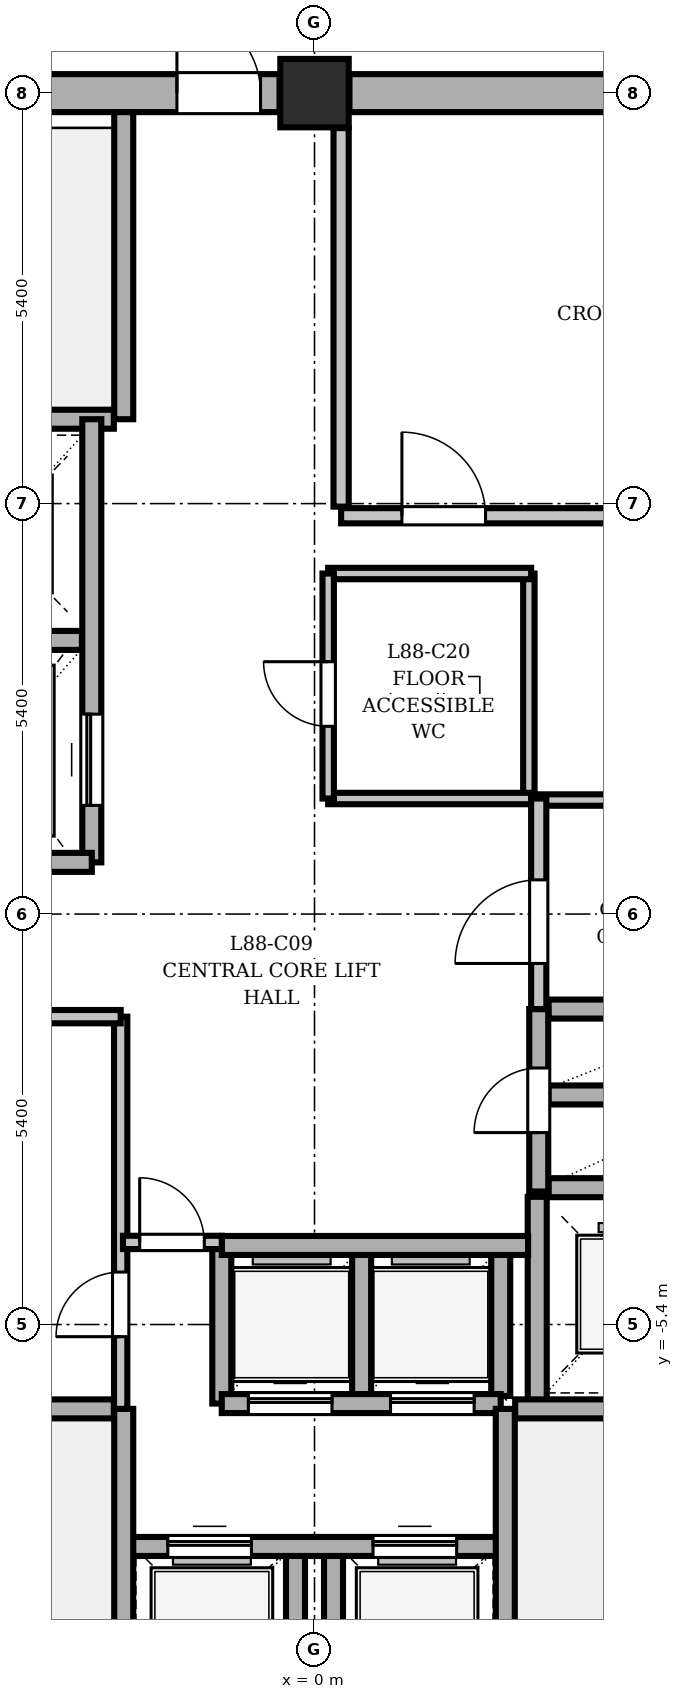
"""IFC4 building model, lengths in metres.
Left out: names, types, materials, properties, quantities, classifications, styles, units other than length and angle.
Written with IfcOpenShell. Run it as: python <this file> out.ifc"""

import sys

from ifc_helpers import new_model, si_unit, direction, frame, frame_2d, origin, origin_2d, place, context, subcontext, project, spatial, rectangle, extrude, element, fill, save


model = new_model("IFC4")
c1 = context("Model", 3, precision=1e-05, world=origin(), true_north=direction((0.0, 1.0)))
c2 = subcontext(c1, "Body", "Model", "MODEL_VIEW")
j1 = project(units=[si_unit("LENGTHUNIT", "METRE"), si_unit("PLANEANGLEUNIT", "RADIAN")], contexts=[c1])
p1 = place(None, origin())
s1 = spatial("IfcSite", under=j1, at=p1, CompositionType="ELEMENT")
p2 = place(p1, origin())
s2 = spatial("IfcBuilding", under=s1, at=p2, CompositionType="ELEMENT")
p3 = place(p2, frame((0.0, 0.0, 337.5)))
s3 = spatial("IfcBuildingStorey", under=s2, at=p3, CompositionType="ELEMENT", Elevation=337.5)
p4 = place(p3, frame((0.0, 10.8, 0.0), z_axis=(0.0, 0.0, 1.0), x_axis=(1.0, 0.0, 0.0)))
e1 = element("IfcColumn", 1, at=p4, inside=s3, PredefinedType="COLUMN", context=c2, shape_type="SweptSolid", body=[
    extrude(rectangle(XDim=0.9, YDim=0.9, at=origin_2d()), origin(), (0.0, 0.0, 1.0), 4.5),
])
p5 = place(p3, frame((-4.94, 10.8, 0.0), z_axis=(0.0, 0.0, 1.0), x_axis=(1.0, 0.0, 0.0)))
e2 = element("IfcWall", 2, at=p5, inside=s3, PredefinedType="SHEAR", context=c2, shape_type="SweptSolid", body=[
    extrude(rectangle(XDim=4.48, YDim=0.5, at=frame_2d((2.24, 0.0))), origin(), (0.0, 0.0, 1.0), 4.5),
])
p6 = place(p5, frame((3.13, 0.0, 0.0)))
e3 = element("IfcOpeningElement", 3, at=p6, cuts=e2, PredefinedType="OPENING", context=c2, shape_type="SweptSolid", body=[
    extrude(rectangle(XDim=1.1, YDim=2.1, at=frame_2d((0.55, 1.05))), frame((0.0, 0.26, 0.0), z_axis=(0.0, -1.0, 0.0), x_axis=(1.0, 0.0, 0.0)), (0.0, 0.0, 1.0), 0.52),
])
p7 = place(p3, frame((0.46, 10.8, 0.0), z_axis=(0.0, 0.0, 1.0), x_axis=(1.0, 0.0, 0.0)))
e4 = element("IfcWall", 4, at=p7, inside=s3, PredefinedType="SHEAR", context=c2, shape_type="SweptSolid", body=[
    extrude(rectangle(XDim=4.48, YDim=0.5, at=frame_2d((2.24, 0.0))), origin(), (0.0, 0.0, 1.0), 4.5),
])
p8 = place(p3, frame((2.93, -6.51, 0.0), z_axis=(0.0, 0.0, 1.0), x_axis=(0.0, 1.0, 0.0)))
e5 = element("IfcWall", 5, at=p8, inside=s3, PredefinedType="SHEAR", context=c2, shape_type="SweptSolid", body=[
    extrude(rectangle(XDim=2.79, YDim=0.25, at=frame_2d((1.395, 0.0))), origin(), (0.0, 0.0, 1.0), 4.5),
])
p9 = place(p3, frame((3.08, -3.6, 0.0), z_axis=(0.0, 0.0, 1.0), x_axis=(1.0, 0.0, 0.0)))
e6 = element("IfcWall", 6, at=p9, inside=s3, PredefinedType="SHEAR", context=c2, shape_type="SweptSolid", body=[
    extrude(rectangle(XDim=2.37, YDim=0.25, at=frame_2d((1.185, 0.0))), origin(), (0.0, 0.0, 1.0), 4.5),
])
for number, where, z_axis, x_axis in (
    (7, (0.62, -6.34, 0.0), (0.0, 0.0, 1.0), (0.0, 1.0, 0.0)),
    (8, (2.45, -6.34, 0.0), (0.0, 0.0, 1.0), (0.0, 1.0, 0.0)),
):
    element("IfcWall", number, at=place(p3, frame(where, z_axis=z_axis, x_axis=x_axis)), inside=s3, PredefinedType="SHEAR", context=c2, shape_type="SweptSolid", body=[
        extrude(rectangle(XDim=1.88, YDim=0.25, at=frame_2d((0.94, 0.0))), origin(), (0.0, 0.0, 1.0), 4.5),
    ])
for number, where, z_axis, x_axis in (
    (9, (-0.25, -10.35, 0.0), (0.0, 0.0, 1.0), (0.0, 1.0, 0.0)),
    (10, (0.25, -10.35, 0.0), (0.0, 0.0, 1.0), (0.0, 1.0, 0.0)),
):
    element("IfcWall", number, at=place(p3, frame(where, z_axis=z_axis, x_axis=x_axis)), inside=s3, PredefinedType="SHEAR", context=c2, shape_type="SweptSolid", body=[
        extrude(rectangle(XDim=1.91, YDim=0.25, at=frame_2d((0.955, 0.0))), origin(), (0.0, 0.0, 1.0), 4.5),
    ])
p10 = place(p3, frame((-1.22, -6.44, 0.0), z_axis=(0.0, 0.0, 1.0), x_axis=(0.0, 1.0, 0.0)))
e11 = element("IfcWall", 11, at=p10, inside=s3, PredefinedType="SHEAR", context=c2, shape_type="SweptSolid", body=[
    extrude(rectangle(XDim=2.08, YDim=0.25, at=frame_2d((1.04, 0.0))), origin(), (0.0, 0.0, 1.0), 4.5),
])
p11 = place(p3, frame((-1.22, -6.44, 0.0), z_axis=(0.0, 0.0, 1.0), x_axis=(1.0, 0.0, 0.0)))
e12 = element("IfcWall", 12, at=p11, inside=s3, PredefinedType="SHEAR", context=c2, shape_type="SweptSolid", body=[
    extrude(rectangle(XDim=3.67, YDim=0.25, at=frame_2d((1.835, 0.0))), origin(), (0.0, 0.0, 1.0), 4.5),
])
p12 = place(p11, frame((0.35, 0.0, 0.0)))
e13 = element("IfcOpeningElement", 13, at=p12, cuts=e12, PredefinedType="OPENING", context=c2, shape_type="SweptSolid", body=[
    extrude(rectangle(XDim=1.1, YDim=2.1, at=frame_2d((0.55, 1.05))), frame((0.0, 0.135, 0.0), z_axis=(0.0, -1.0, 0.0), x_axis=(1.0, 0.0, 0.0)), (0.0, 0.0, 1.0), 0.27),
])
p13 = place(p11, frame((2.22, 0.0, 0.0)))
e14 = element("IfcOpeningElement", 14, at=p13, cuts=e12, PredefinedType="OPENING", context=c2, shape_type="SweptSolid", body=[
    extrude(rectangle(XDim=1.1, YDim=2.1, at=frame_2d((0.55, 1.05))), frame((0.0, 0.135, 0.0), z_axis=(0.0, -1.0, 0.0), x_axis=(1.0, 0.0, 0.0)), (0.0, 0.0, 1.0), 0.27),
])
p14 = place(p3, frame((-2.48, -8.32, 0.0), z_axis=(0.0, 0.0, 1.0), x_axis=(1.0, 0.0, 0.0)))
e15 = element("IfcWall", 15, at=p14, inside=s3, PredefinedType="SHEAR", context=c2, shape_type="SweptSolid", body=[
    extrude(rectangle(XDim=4.93, YDim=0.25, at=frame_2d((2.465, 0.0))), origin(), (0.0, 0.0, 1.0), 4.5),
])
p15 = place(p14, frame((0.55, 0.0, 0.0)))
e16 = element("IfcOpeningElement", 16, at=p15, cuts=e15, PredefinedType="OPENING", context=c2, shape_type="SweptSolid", body=[
    extrude(rectangle(XDim=1.1, YDim=2.1, at=frame_2d((0.55, 1.05))), frame((0.0, 0.135, 0.0), z_axis=(0.0, -1.0, 0.0), x_axis=(1.0, 0.0, 0.0)), (0.0, 0.0, 1.0), 0.27),
])
p16 = place(p14, frame((3.25, 0.0, 0.0)))
e17 = element("IfcOpeningElement", 17, at=p16, cuts=e15, PredefinedType="OPENING", context=c2, shape_type="SweptSolid", body=[
    extrude(rectangle(XDim=1.1, YDim=2.1, at=frame_2d((0.55, 1.05))), frame((0.0, 0.135, 0.0), z_axis=(0.0, -1.0, 0.0), x_axis=(1.0, 0.0, 0.0)), (0.0, 0.0, 1.0), 0.27),
])
p17 = place(p3, frame((-1.22, -4.36, 0.0), z_axis=(0.0, 0.0, 1.0), x_axis=(1.0, 0.0, 0.0)))
e18 = element("IfcWall", 18, at=p17, inside=s3, PredefinedType="SHEAR", context=c2, shape_type="SweptSolid", body=[
    extrude(rectangle(XDim=4.03, YDim=0.25, at=frame_2d((2.015, 0.0))), origin(), (0.0, 0.0, 1.0), 4.5),
])
for number, where, z_axis, x_axis in (
    (19, (3.08, -2.38, 0.0), (0.0, 0.0, 1.0), (1.0, 0.0, 0.0)),
    (20, (3.08, -1.25, 0.0), (0.0, 0.0, 1.0), (1.0, 0.0, 0.0)),
):
    element("IfcWall", number, at=place(p3, frame(where, z_axis=z_axis, x_axis=x_axis)), inside=s3, PredefinedType="SHEAR", context=c2, shape_type="SweptSolid", body=[
        extrude(rectangle(XDim=2.37, YDim=0.25, at=frame_2d((1.185, 0.0))), origin(), (0.0, 0.0, 1.0), 4.5),
    ])
p18 = place(p3, frame((2.95, -3.65, 0.0), z_axis=(0.0, 0.0, 1.0), x_axis=(0.0, 1.0, 0.0)))
e21 = element("IfcWall", 21, at=p18, inside=s3, PredefinedType="SHEAR", context=c2, shape_type="SweptSolid", body=[
    extrude(rectangle(XDim=2.4, YDim=0.25, at=frame_2d((1.2, 0.0))), origin(), (0.0, 0.0, 1.0), 4.5),
])
p19 = place(p18, frame((0.775, 0.0, 0.0)))
e22 = element("IfcOpeningElement", 22, at=p19, cuts=e21, PredefinedType="OPENING", context=c2, shape_type="SweptSolid", body=[
    extrude(rectangle(XDim=0.85, YDim=2.1, at=frame_2d((0.425, 1.05))), frame((0.0, 0.135, 0.0), z_axis=(0.0, -1.0, 0.0), x_axis=(1.0, 0.0, 0.0)), (0.0, 0.0, 1.0), 0.27),
])
p20 = place(p3, frame((-2.51, 6.51, 0.0), z_axis=(0.0, 0.0, 1.0), x_axis=(0.0, 1.0, 0.0)))
e23 = element("IfcWall", 23, at=p20, inside=s3, PredefinedType="SHEAR", context=c2, shape_type="SweptSolid", body=[
    extrude(rectangle(XDim=4.04, YDim=0.25, at=frame_2d((2.02, 0.0))), origin(), (0.0, 0.0, 1.0), 4.5),
])
p21 = place(p3, frame((-10.34, 6.51, 0.0), z_axis=(0.0, 0.0, 1.0), x_axis=(1.0, 0.0, 0.0)))
e24 = element("IfcWall", 24, at=p21, inside=s3, PredefinedType="SHEAR", context=c2, shape_type="SweptSolid", body=[
    extrude(rectangle(XDim=7.7, YDim=0.25, at=frame_2d((3.85, 0.0))), origin(), (0.0, 0.0, 1.0), 4.5),
])
p22 = place(p21, frame((0.35, 0.0, 0.0)))
e25 = element("IfcOpeningElement", 25, at=p22, cuts=e24, PredefinedType="OPENING", context=c2, shape_type="SweptSolid", body=[
    extrude(rectangle(XDim=1.1, YDim=2.1, at=frame_2d((0.55, 1.05))), frame((0.0, 0.135, 0.0), z_axis=(0.0, -1.0, 0.0), x_axis=(1.0, 0.0, 0.0)), (0.0, 0.0, 1.0), 0.27),
])
p23 = place(p3, frame((2.64, -6.51, 0.0), z_axis=(0.0, 0.0, 1.0), x_axis=(1.0, 0.0, 0.0)))
e26 = element("IfcWall", 26, at=p23, inside=s3, PredefinedType="SHEAR", context=c2, shape_type="SweptSolid", body=[
    extrude(rectangle(XDim=7.7, YDim=0.25, at=frame_2d((3.85, 0.0))), origin(), (0.0, 0.0, 1.0), 4.5),
])
p24 = place(p23, frame((6.0, 0.0, 0.0)))
e27 = element("IfcOpeningElement", 27, at=p24, cuts=e26, PredefinedType="OPENING", context=c2, shape_type="SweptSolid", body=[
    extrude(rectangle(XDim=0.95, YDim=2.1, at=frame_2d((0.475, 1.05))), frame((0.0, 0.135, 0.0), z_axis=(0.0, -1.0, 0.0), x_axis=(1.0, 0.0, 0.0)), (0.0, 0.0, 1.0), 0.27),
])
for number, where, z_axis, x_axis in (
    (28, (2.51, -10.55, 0.0), (0.0, 0.0, 1.0), (0.0, 1.0, 0.0)),
    (29, (-2.51, -10.55, 0.0), (0.0, 0.0, 1.0), (0.0, 1.0, 0.0)),
):
    element("IfcWall", number, at=place(p3, frame(where, z_axis=z_axis, x_axis=x_axis)), inside=s3, PredefinedType="SHEAR", context=c2, shape_type="SweptSolid", body=[
        extrude(rectangle(XDim=4.04, YDim=0.25, at=frame_2d((2.02, 0.0))), origin(), (0.0, 0.0, 1.0), 4.5),
    ])
p25 = place(p3, frame((-10.34, -6.51, 0.0), z_axis=(0.0, 0.0, 1.0), x_axis=(1.0, 0.0, 0.0)))
e30 = element("IfcWall", 30, at=p25, inside=s3, PredefinedType="SHEAR", context=c2, shape_type="SweptSolid", body=[
    extrude(rectangle(XDim=7.7, YDim=0.25, at=frame_2d((3.85, 0.0))), origin(), (0.0, 0.0, 1.0), 4.5),
])
p26 = place(p25, frame((0.35, 0.0, 0.0)))
e31 = element("IfcOpeningElement", 31, at=p26, cuts=e30, PredefinedType="OPENING", context=c2, shape_type="SweptSolid", body=[
    extrude(rectangle(XDim=1.1, YDim=2.1, at=frame_2d((0.55, 1.05))), frame((0.0, 0.135, 0.0), z_axis=(0.0, -1.0, 0.0), x_axis=(1.0, 0.0, 0.0)), (0.0, 0.0, 1.0), 0.27),
])
p27 = place(p3, frame((-2.93, 0.68, 0.0), z_axis=(0.0, 0.0, 1.0), x_axis=(0.0, 1.0, 0.0)))
e32 = element("IfcWall", 32, at=p27, inside=s3, PredefinedType="SHEAR", context=c2, shape_type="SweptSolid", body=[
    extrude(rectangle(XDim=5.83, YDim=0.25, at=frame_2d((2.915, 0.0))), origin(), (0.0, 0.0, 1.0), 4.5),
])
p28 = place(p27, frame((0.75, 0.0, 0.0)))
e33 = element("IfcOpeningElement", 33, at=p28, cuts=e32, PredefinedType="OPENING", context=c2, shape_type="SweptSolid", body=[
    extrude(rectangle(XDim=1.2, YDim=2.1, at=frame_2d((0.6, 1.05))), frame((0.0, 0.135, 0.0), z_axis=(0.0, -1.0, 0.0), x_axis=(1.0, 0.0, 0.0)), (0.0, 0.0, 1.0), 0.27),
])
p29 = place(p3, frame((-5.45, 3.6, 0.0), z_axis=(0.0, 0.0, 1.0), x_axis=(1.0, 0.0, 0.0)))
e34 = element("IfcWall", 34, at=p29, inside=s3, PredefinedType="SHEAR", context=c2, shape_type="SweptSolid", body=[
    extrude(rectangle(XDim=2.39, YDim=0.25, at=frame_2d((1.195, 0.0))), origin(), (0.0, 0.0, 1.0), 4.5),
])
p30 = place(p3, frame((-5.58, 0.68, 0.0), z_axis=(0.0, 0.0, 1.0), x_axis=(1.0, 0.0, 0.0)))
e35 = element("IfcWall", 35, at=p30, inside=s3, PredefinedType="SHEAR", context=c2, shape_type="SweptSolid", body=[
    extrude(rectangle(XDim=2.65, YDim=0.25, at=frame_2d((1.325, 0.0))), origin(), (0.0, 0.0, 1.0), 4.5),
])
p31 = place(p3, frame((2.82, 1.52, 0.0), z_axis=(0.0, 0.0, 1.0), x_axis=(0.0, 1.0, 0.0)))
e36 = element("IfcWall", 36, at=p31, inside=s3, PredefinedType="PARTITIONING", context=c2, shape_type="SweptSolid", body=[
    extrude(rectangle(XDim=2.96, YDim=0.15, at=frame_2d((1.48, 0.0))), origin(), (0.0, 0.0, 1.0), 4.22),
])
for number, where, z_axis, x_axis in (
    (37, (0.18, 4.48, 0.0), (0.0, 0.0, 1.0), (1.0, 0.0, 0.0)),
    (38, (0.18, 1.52, 0.0), (0.0, 0.0, 1.0), (1.0, 0.0, 0.0)),
):
    element("IfcWall", number, at=place(p3, frame(where, z_axis=z_axis, x_axis=x_axis)), inside=s3, PredefinedType="PARTITIONING", context=c2, shape_type="SweptSolid", body=[
        extrude(rectangle(XDim=2.67, YDim=0.15, at=frame_2d((1.335, 0.0))), origin(), (0.0, 0.0, 1.0), 4.22),
    ])
p32 = place(p3, frame((0.18, 1.52, 0.0), z_axis=(0.0, 0.0, 1.0), x_axis=(0.0, 1.0, 0.0)))
e39 = element("IfcWall", 39, at=p32, inside=s3, PredefinedType="PARTITIONING", context=c2, shape_type="SweptSolid", body=[
    extrude(rectangle(XDim=2.96, YDim=0.15, at=frame_2d((1.48, 0.0))), origin(), (0.0, 0.0, 1.0), 4.22),
])
p33 = place(p32, frame((0.95, 0.0, 0.0)))
e40 = element("IfcOpeningElement", 40, at=p33, cuts=e39, PredefinedType="OPENING", context=c2, shape_type="SweptSolid", body=[
    extrude(rectangle(XDim=0.85, YDim=2.1, at=frame_2d((0.425, 1.05))), frame((0.0, 0.085, 0.0), z_axis=(0.0, -1.0, 0.0), x_axis=(1.0, 0.0, 0.0)), (0.0, 0.0, 1.0), 0.17),
])
p34 = place(p3, frame((2.95, 1.5, 0.0), z_axis=(0.0, 0.0, 1.0), x_axis=(1.0, 0.0, 0.0)))
e41 = element("IfcWall", 41, at=p34, inside=s3, PredefinedType="PARTITIONING", context=c2, shape_type="SweptSolid", body=[
    extrude(rectangle(XDim=7.39, YDim=0.15, at=frame_2d((3.695, 0.0))), origin(), (0.0, 0.0, 1.0), 4.22),
])
p35 = place(p34, frame((2.2, 0.0, 0.0)))
e42 = element("IfcOpeningElement", 42, at=p35, cuts=e41, PredefinedType="OPENING", context=c2, shape_type="SweptSolid", body=[
    extrude(rectangle(XDim=0.95, YDim=2.1, at=frame_2d((0.475, 1.05))), frame((0.0, 0.085, 0.0), z_axis=(0.0, -1.0, 0.0), x_axis=(1.0, 0.0, 0.0)), (0.0, 0.0, 1.0), 0.17),
])
p36 = place(p3, frame((0.35, 5.24, 0.0), z_axis=(0.0, 0.0, 1.0), x_axis=(1.0, 0.0, 0.0)))
e43 = element("IfcWall", 43, at=p36, inside=s3, PredefinedType="PARTITIONING", context=c2, shape_type="SweptSolid", body=[
    extrude(rectangle(XDim=9.99, YDim=0.2, at=frame_2d((4.995, 0.0))), origin(), (0.0, 0.0, 1.0), 4.22),
])
p37 = place(p36, frame((0.8, 0.0, 0.0)))
e44 = element("IfcOpeningElement", 44, at=p37, cuts=e43, PredefinedType="OPENING", context=c2, shape_type="SweptSolid", body=[
    extrude(rectangle(XDim=1.1, YDim=2.1, at=frame_2d((0.55, 1.05))), frame((0.0, 0.11, 0.0), z_axis=(0.0, -1.0, 0.0), x_axis=(1.0, 0.0, 0.0)), (0.0, 0.0, 1.0), 0.22),
])
p38 = place(p3, frame((0.35, 5.36, 0.0), z_axis=(0.0, 0.0, 1.0), x_axis=(0.0, 1.0, 0.0)))
e45 = element("IfcWall", 45, at=p38, inside=s3, PredefinedType="PARTITIONING", context=c2, shape_type="SweptSolid", body=[
    extrude(rectangle(XDim=4.98, YDim=0.2, at=frame_2d((2.49, 0.0))), origin(), (0.0, 0.0, 1.0), 4.22),
])
p39 = place(p3, frame((-2.55, -6.51, 0.0), z_axis=(0.0, 0.0, 1.0), x_axis=(0.0, 1.0, 0.0)))
e46 = element("IfcWall", 46, at=p39, inside=s3, PredefinedType="PARTITIONING", context=c2, shape_type="SweptSolid", body=[
    extrude(rectangle(XDim=5.16, YDim=0.175, at=frame_2d((2.58, 0.0))), origin(), (0.0, 0.0, 1.0), 4.22),
])
p40 = place(p39, frame((0.95, 0.0, 0.0)))
e47 = element("IfcOpeningElement", 47, at=p40, cuts=e46, PredefinedType="OPENING", context=c2, shape_type="SweptSolid", body=[
    extrude(rectangle(XDim=0.85, YDim=2.1, at=frame_2d((0.425, 1.05))), frame((0.0, 0.097, 0.0), z_axis=(0.0, -1.0, 0.0), x_axis=(1.0, 0.0, 0.0)), (0.0, 0.0, 1.0), 0.195),
])
p41 = place(p3, frame((-7.18, -1.35, 0.0), z_axis=(0.0, 0.0, 1.0), x_axis=(1.0, 0.0, 0.0)))
e48 = element("IfcWall", 48, at=p41, inside=s3, PredefinedType="PARTITIONING", context=c2, shape_type="SweptSolid", body=[
    extrude(rectangle(XDim=4.63, YDim=0.175, at=frame_2d((2.315, 0.0))), origin(), (0.0, 0.0, 1.0), 4.22),
])
p42 = place(p3, frame((-2.52, -4.32, 0.0), z_axis=(0.0, 0.0, 1.0), x_axis=(1.0, 0.0, 0.0)))
e49 = element("IfcWall", 49, at=p42, inside=s3, PredefinedType="PARTITIONING", context=c2, shape_type="SweptSolid", body=[
    extrude(rectangle(XDim=1.3, YDim=0.175, at=frame_2d((0.65, 0.0))), origin(), (0.0, 0.0, 1.0), 4.22),
])
p43 = place(p42, frame((0.22, 0.0, 0.0)))
e50 = element("IfcOpeningElement", 50, at=p43, cuts=e49, PredefinedType="OPENING", context=c2, shape_type="SweptSolid", body=[
    extrude(rectangle(XDim=0.85, YDim=2.1, at=frame_2d((0.425, 1.05))), frame((0.0, 0.097, 0.0), z_axis=(0.0, -1.0, 0.0), x_axis=(1.0, 0.0, 0.0)), (0.0, 0.0, 1.0), 0.195),
])
p44 = place(p3, frame((2.95, -1.25, 0.0), z_axis=(0.0, 0.0, 1.0), x_axis=(0.0, 1.0, 0.0)))
e51 = element("IfcWall", 51, at=p44, inside=s3, PredefinedType="PARTITIONING", context=c2, shape_type="SweptSolid", body=[
    extrude(rectangle(XDim=2.77, YDim=0.2, at=frame_2d((1.385, 0.0))), origin(), (0.0, 0.0, 1.0), 4.22),
])
p45 = place(p44, frame((0.6, 0.0, 0.0)))
e52 = element("IfcOpeningElement", 52, at=p45, cuts=e51, PredefinedType="OPENING", context=c2, shape_type="SweptSolid", body=[
    extrude(rectangle(XDim=1.1, YDim=2.1, at=frame_2d((0.55, 1.05))), frame((0.0, 0.11, 0.0), z_axis=(0.0, -1.0, 0.0), x_axis=(1.0, 0.0, 0.0)), (0.0, 0.0, 1.0), 0.22),
])
p46 = place(p33, origin())
e53 = element("IfcDoor", 53, at=p46, inside=s3, OperationType="SINGLE_SWING_RIGHT", PredefinedType="DOOR", context=c2, shape_type="SweptSolid", body=[
    extrude(rectangle(XDim=0.85, YDim=2.1, at=frame_2d((0.425, 1.05))), frame((0.0, 0.025, 0.0), z_axis=(0.0, -1.0, 0.0), x_axis=(1.0, 0.0, 0.0)), (0.0, 0.0, 1.0), 0.05),
])
fill(e40, e53)
p47 = place(p19, origin())
e54 = element("IfcDoor", 54, at=p47, inside=s3, OperationType="SINGLE_SWING_LEFT", PredefinedType="DOOR", context=c2, shape_type="SweptSolid", body=[
    extrude(rectangle(XDim=0.85, YDim=2.1, at=frame_2d((0.425, 1.05))), frame((0.0, 0.025, 0.0), z_axis=(0.0, -1.0, 0.0), x_axis=(1.0, 0.0, 0.0)), (0.0, 0.0, 1.0), 0.05),
])
fill(e22, e54)
p48 = place(p6, origin())
e55 = element("IfcDoor", 55, at=p48, inside=s3, OperationType="SINGLE_SWING_LEFT", PredefinedType="DOOR", context=c2, shape_type="SweptSolid", body=[
    extrude(rectangle(XDim=1.1, YDim=2.1, at=frame_2d((0.55, 1.05))), frame((0.0, 0.025, 0.0), z_axis=(0.0, -1.0, 0.0), x_axis=(1.0, 0.0, 0.0)), (0.0, 0.0, 1.0), 0.05),
])
fill(e3, e55)
p49 = place(p28, origin())
e56 = element("IfcDoor", 56, at=p49, inside=s3, OperationType="SLIDING_TO_LEFT", PredefinedType="DOOR", context=c2, shape_type="SweptSolid", body=[
    extrude(rectangle(XDim=1.2, YDim=2.1, at=frame_2d((0.6, 1.05))), frame((0.0, 0.025, 0.0), z_axis=(0.0, -1.0, 0.0), x_axis=(1.0, 0.0, 0.0)), (0.0, 0.0, 1.0), 0.05),
])
fill(e33, e56)
p50 = place(p37, origin())
e57 = element("IfcDoor", 57, at=p50, inside=s3, OperationType="SINGLE_SWING_LEFT", PredefinedType="DOOR", context=c2, shape_type="SweptSolid", body=[
    extrude(rectangle(XDim=1.1, YDim=2.1, at=frame_2d((0.55, 1.05))), frame((0.0, 0.025, 0.0), z_axis=(0.0, -1.0, 0.0), x_axis=(1.0, 0.0, 0.0)), (0.0, 0.0, 1.0), 0.05),
])
fill(e44, e57)
p51 = place(p45, origin())
e58 = element("IfcDoor", 58, at=p51, inside=s3, OperationType="SINGLE_SWING_LEFT", PredefinedType="DOOR", context=c2, shape_type="SweptSolid", body=[
    extrude(rectangle(XDim=1.1, YDim=2.1, at=frame_2d((0.55, 1.05))), frame((0.0, 0.025, 0.0), z_axis=(0.0, -1.0, 0.0), x_axis=(1.0, 0.0, 0.0)), (0.0, 0.0, 1.0), 0.05),
])
fill(e52, e58)
p52 = place(p43, origin())
e59 = element("IfcDoor", 59, at=p52, inside=s3, OperationType="SINGLE_SWING_LEFT", PredefinedType="DOOR", context=c2, shape_type="SweptSolid", body=[
    extrude(rectangle(XDim=0.85, YDim=2.1, at=frame_2d((0.425, 1.05))), frame((0.0, 0.025, 0.0), z_axis=(0.0, -1.0, 0.0), x_axis=(1.0, 0.0, 0.0)), (0.0, 0.0, 1.0), 0.05),
])
fill(e50, e59)
p53 = place(p12, origin())
e60 = element("IfcDoor", 60, at=p53, inside=s3, OperationType="SLIDING_TO_LEFT", PredefinedType="DOOR", context=c2, shape_type="SweptSolid", body=[
    extrude(rectangle(XDim=1.1, YDim=2.1, at=frame_2d((0.55, 1.05))), frame((0.0, 0.025, 0.0), z_axis=(0.0, -1.0, 0.0), x_axis=(1.0, 0.0, 0.0)), (0.0, 0.0, 1.0), 0.05),
])
fill(e13, e60)
p54 = place(p13, origin())
e61 = element("IfcDoor", 61, at=p54, inside=s3, OperationType="SLIDING_TO_LEFT", PredefinedType="DOOR", context=c2, shape_type="SweptSolid", body=[
    extrude(rectangle(XDim=1.1, YDim=2.1, at=frame_2d((0.55, 1.05))), frame((0.0, 0.025, 0.0), z_axis=(0.0, -1.0, 0.0), x_axis=(1.0, 0.0, 0.0)), (0.0, 0.0, 1.0), 0.05),
])
fill(e14, e61)
p55 = place(p15, origin())
e62 = element("IfcDoor", 62, at=p55, inside=s3, OperationType="SLIDING_TO_LEFT", PredefinedType="DOOR", context=c2, shape_type="SweptSolid", body=[
    extrude(rectangle(XDim=1.1, YDim=2.1, at=frame_2d((0.55, 1.05))), frame((0.0, 0.025, 0.0), z_axis=(0.0, -1.0, 0.0), x_axis=(1.0, 0.0, 0.0)), (0.0, 0.0, 1.0), 0.05),
])
fill(e16, e62)
p56 = place(p16, origin())
e63 = element("IfcDoor", 63, at=p56, inside=s3, OperationType="SLIDING_TO_LEFT", PredefinedType="DOOR", context=c2, shape_type="SweptSolid", body=[
    extrude(rectangle(XDim=1.1, YDim=2.1, at=frame_2d((0.55, 1.05))), frame((0.0, 0.025, 0.0), z_axis=(0.0, -1.0, 0.0), x_axis=(1.0, 0.0, 0.0)), (0.0, 0.0, 1.0), 0.05),
])
fill(e17, e63)
p57 = place(p40, origin())
e64 = element("IfcDoor", 64, at=p57, inside=s3, OperationType="SINGLE_SWING_LEFT", PredefinedType="DOOR", context=c2, shape_type="SweptSolid", body=[
    extrude(rectangle(XDim=0.85, YDim=2.1, at=frame_2d((0.425, 1.05))), frame((0.0, 0.025, 0.0), z_axis=(0.0, -1.0, 0.0), x_axis=(1.0, 0.0, 0.0)), (0.0, 0.0, 1.0), 0.05),
])
fill(e47, e64)
save(model, sys.argv[1])
